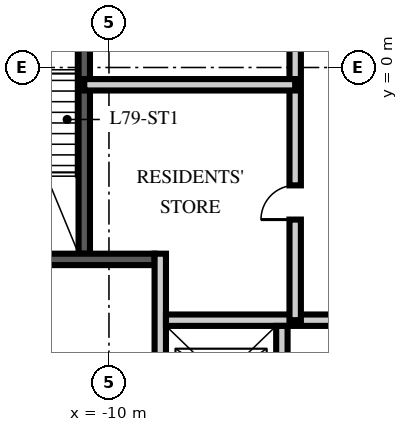
"""IFC4 building model, lengths in metres.
Left out: names, types, materials, properties, quantities, classifications, styles, units other than length and angle.
Written with IfcOpenShell. Run it as: python <this file> out.ifc"""

import sys

from ifc_helpers import new_model, si_unit, direction, frame, frame_2d, origin, place, context, subcontext, project, spatial, rectangle, extrude, element, fill, save


model = new_model("IFC4")
c1 = context("Model", 3, precision=1e-05, world=origin(), true_north=direction((0.0, 1.0)))
c2 = subcontext(c1, "Body", "Model", "MODEL_VIEW")
j1 = project(units=[si_unit("LENGTHUNIT", "METRE"), si_unit("PLANEANGLEUNIT", "RADIAN")], contexts=[c1])
p1 = place(None, origin())
s1 = spatial("IfcSite", under=j1, at=p1, CompositionType="ELEMENT")
p2 = place(p1, origin())
s2 = spatial("IfcBuilding", under=s1, at=p2, CompositionType="ELEMENT")
p3 = place(p2, frame((0.0, 0.0, 315.75)))
s3 = spatial("IfcBuildingStorey", under=s2, at=p3, CompositionType="ELEMENT", Elevation=315.75)
p4 = place(p3, frame((-10.65, -4.9, 0.0), z_axis=(0.0, 0.0, 1.0), x_axis=(0.0, 1.0, 0.0)))
e1 = element("IfcWall", 1, at=p4, inside=s3, PredefinedType="SOLIDWALL", context=c2, shape_type="SweptSolid", body=[
    extrude(rectangle(XDim=10.1, YDim=0.3, at=frame_2d((5.05, 0.0))), origin(), (0.0, 0.0, 1.0), 3.5),
])
p5 = place(p3, frame((-14.85, -5.05, 0.0), z_axis=(0.0, 0.0, 1.0), x_axis=(1.0, 0.0, 0.0)))
e2 = element("IfcWall", 2, at=p5, inside=s3, PredefinedType="SOLIDWALL", context=c2, shape_type="SweptSolid", body=[
    extrude(rectangle(XDim=6.05, YDim=0.3, at=frame_2d((3.025, 0.0))), origin(), (0.0, 0.0, 1.0), 3.5),
])
p6 = place(p5, frame((1.425, 0.0, 0.0)))
e3 = element("IfcOpeningElement", 3, at=p6, cuts=e2, PredefinedType="OPENING", context=c2, shape_type="SweptSolid", body=[
    extrude(rectangle(XDim=1.2, YDim=2.1, at=frame_2d((0.6, 1.05))), frame((0.0, 0.16, 0.0), z_axis=(0.0, -1.0, 0.0), x_axis=(1.0, 0.0, 0.0)), (0.0, 0.0, 1.0), 0.32),
])
p7 = place(p3, frame((-8.65, -11.35, 0.0), z_axis=(0.0, 0.0, 1.0), x_axis=(0.0, 1.0, 0.0)))
e4 = element("IfcWall", 4, at=p7, inside=s3, PredefinedType="PARTITIONING", context=c2, shape_type="SweptSolid", body=[
    extrude(rectangle(XDim=6.45, YDim=0.3, at=frame_2d((3.225, 0.0))), origin(), (0.0, 0.0, 1.0), 3.5),
])
p8 = place(p7, frame((2.6, 0.0, 0.0)))
e5 = element("IfcOpeningElement", 5, at=p8, cuts=e4, PredefinedType="OPENING", context=c2, shape_type="SweptSolid", body=[
    extrude(rectangle(XDim=1.1, YDim=2.1, at=frame_2d((0.55, 1.05))), frame((0.0, 0.16, 0.0), z_axis=(0.0, -1.0, 0.0), x_axis=(1.0, 0.0, 0.0)), (0.0, 0.0, 1.0), 0.32),
])
p9 = place(p3, frame((-8.5, -6.65, 0.0), z_axis=(0.0, 0.0, 1.0), x_axis=(1.0, 0.0, 0.0)))
e6 = element("IfcWall", 6, at=p9, inside=s3, PredefinedType="PARTITIONING", context=c2, shape_type="SweptSolid", body=[
    extrude(rectangle(XDim=17.0, YDim=0.3, at=frame_2d((8.5, 0.0))), origin(), (0.0, 0.0, 1.0), 3.5),
])
p10 = place(p9, frame((7.8, 0.0, 0.0)))
e7 = element("IfcOpeningElement", 7, at=p10, cuts=e6, PredefinedType="OPENING", context=c2, shape_type="SweptSolid", body=[
    extrude(rectangle(XDim=1.3, YDim=2.4, at=frame_2d((0.65, 1.2))), frame((0.0, 0.16, 0.0), z_axis=(0.0, -1.0, 0.0), x_axis=(1.0, 0.0, 0.0)), (0.0, 0.0, 1.0), 0.32),
])
p11 = place(p9, frame((5.65, 0.0, 0.0)))
e8 = element("IfcOpeningElement", 8, at=p11, cuts=e6, PredefinedType="OPENING", context=c2, shape_type="SweptSolid", body=[
    extrude(rectangle(XDim=0.9, YDim=2.1, at=frame_2d((0.45, 1.05))), frame((0.0, 0.16, 0.0), z_axis=(0.0, -1.0, 0.0), x_axis=(1.0, 0.0, 0.0)), (0.0, 0.0, 1.0), 0.32),
])
p12 = place(p9, frame((10.4, 0.0, 0.0)))
e9 = element("IfcOpeningElement", 9, at=p12, cuts=e6, PredefinedType="OPENING", context=c2, shape_type="SweptSolid", body=[
    extrude(rectangle(XDim=0.9, YDim=2.1, at=frame_2d((0.45, 1.05))), frame((0.0, 0.16, 0.0), z_axis=(0.0, -1.0, 0.0), x_axis=(1.0, 0.0, 0.0)), (0.0, 0.0, 1.0), 0.32),
])
p13 = place(p3, frame((-5.45, -11.35, 0.0), z_axis=(0.0, 0.0, 1.0), x_axis=(0.0, 1.0, 0.0)))
e10 = element("IfcWall", 10, at=p13, inside=s3, PredefinedType="PARTITIONING", context=c2, shape_type="SweptSolid", body=[
    extrude(rectangle(XDim=4.55, YDim=0.3, at=frame_2d((2.275, 0.0))), origin(), (0.0, 0.0, 1.0), 3.5),
])
p14 = place(p3, frame((-5.1, -6.65, 0.0), z_axis=(0.0, 0.0, 1.0), x_axis=(0.0, 1.0, 0.0)))
e11 = element("IfcWall", 11, at=p14, inside=s3, PredefinedType="PARTITIONING", context=c2, shape_type="SweptSolid", body=[
    extrude(rectangle(XDim=9.45, YDim=0.3, at=frame_2d((4.725, 0.0))), origin(), (0.0, 0.0, 1.0), 3.5),
])
p15 = place(p14, frame((2.648, 0.0, 0.0)))
e12 = element("IfcOpeningElement", 12, at=p15, cuts=e11, PredefinedType="OPENING", context=c2, shape_type="SweptSolid", body=[
    extrude(rectangle(XDim=0.9, YDim=2.1, at=frame_2d((0.45, 1.05))), frame((0.0, 0.16, 0.0), z_axis=(0.0, -1.0, 0.0), x_axis=(1.0, 0.0, 0.0)), (0.0, 0.0, 1.0), 0.32),
])
p16 = place(p14, frame((7.373, 0.0, 0.0)))
e13 = element("IfcOpeningElement", 13, at=p16, cuts=e11, PredefinedType="OPENING", context=c2, shape_type="SweptSolid", body=[
    extrude(rectangle(XDim=0.9, YDim=2.1, at=frame_2d((0.45, 1.05))), frame((0.0, 0.16, 0.0), z_axis=(0.0, -1.0, 0.0), x_axis=(1.0, 0.0, 0.0)), (0.0, 0.0, 1.0), 0.32),
])
p17 = place(p3, frame((-10.65, -0.455, 0.0), z_axis=(0.0, 0.0, 1.0), x_axis=(1.0, 0.0, 0.0)))
e14 = element("IfcWall", 14, at=p17, inside=s3, PredefinedType="PARTITIONING", context=c2, shape_type="SweptSolid", body=[
    extrude(rectangle(XDim=5.55, YDim=0.3, at=frame_2d((2.775, 0.0))), origin(), (0.0, 0.0, 1.0), 3.5),
])
p18 = place(p15, origin())
e15 = element("IfcDoor", 15, at=p18, inside=s3, OperationType="SINGLE_SWING_LEFT", PredefinedType="DOOR", context=c2, shape_type="SweptSolid", body=[
    extrude(rectangle(XDim=0.9, YDim=2.1, at=frame_2d((0.45, 1.05))), frame((0.0, 0.025, 0.0), z_axis=(0.0, -1.0, 0.0), x_axis=(1.0, 0.0, 0.0)), (0.0, 0.0, 1.0), 0.05),
])
fill(e12, e15)
save(model, sys.argv[1])
